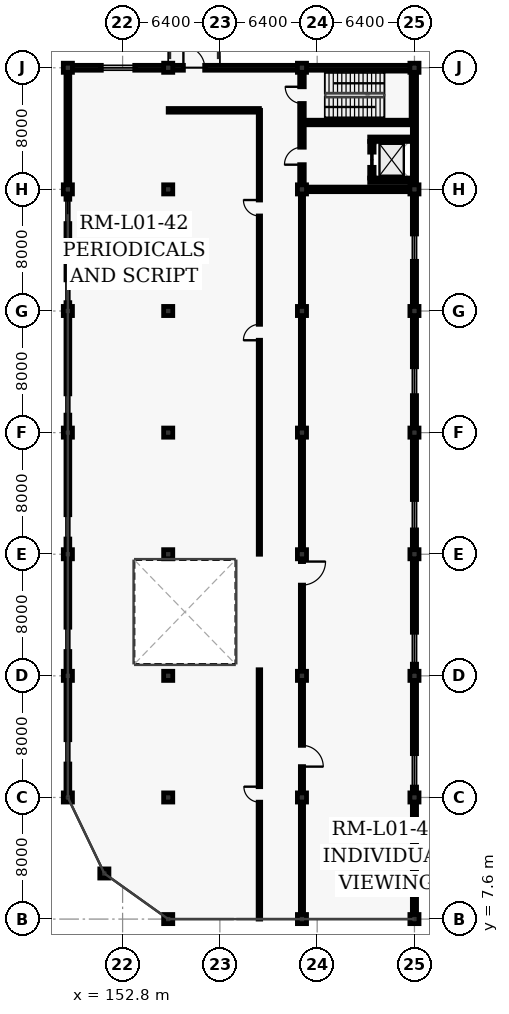
"""IFC4 building model, lengths in metres.
Left out: names, types, materials, properties, quantities, classifications, styles, units other than length and angle.
Written with IfcOpenShell. Run it as: python <this file> out.ifc"""

import sys

from ifc_helpers import new_model, si_unit, direction, frame, frame_2d, origin, origin_2d, place, context, subcontext, project, spatial, rectangle, extrude, element, fill, save


model = new_model("IFC4")
c1 = context("Model", 3, precision=1e-05, world=origin(), true_north=direction((0.0, 1.0)))
c2 = subcontext(c1, "Body", "Model", "MODEL_VIEW")
j1 = project(units=[si_unit("LENGTHUNIT", "METRE"), si_unit("PLANEANGLEUNIT", "RADIAN")], contexts=[c1])
p1 = place(None, origin())
s1 = spatial("IfcSite", under=j1, at=p1, CompositionType="ELEMENT")
p2 = place(p1, origin())
s2 = spatial("IfcBuilding", under=s1, at=p2, CompositionType="ELEMENT")
p3 = place(p2, frame((0.0, 0.0, 5.4)))
s3 = spatial("IfcBuildingStorey", under=s2, at=p3, CompositionType="ELEMENT", Elevation=5.4)
for number, where, z_axis, x_axis in (
    (1, (149.2, 15.6, 0.0), (0.0, 0.0, 1.0), (1.0, 0.0, 0.0)),
    (2, (149.2, 23.6, 0.0), (0.0, 0.0, 1.0), (1.0, 0.0, 0.0)),
    (3, (149.2, 31.6, 0.0), (0.0, 0.0, 1.0), (1.0, 0.0, 0.0)),
    (4, (149.2, 39.6, 0.0), (0.0, 0.0, 1.0), (1.0, 0.0, 0.0)),
    (5, (149.2, 47.6, 0.0), (0.0, 0.0, 1.0), (1.0, 0.0, 0.0)),
    (6, (149.2, 55.6, 0.0), (0.0, 0.0, 1.0), (1.0, 0.0, 0.0)),
    (7, (149.2, 63.6, 0.0), (0.0, 0.0, 1.0), (1.0, 0.0, 0.0)),
    (8, (151.6, 10.6, 0.0), (0.0, 0.0, 1.0), (1.0, 0.0, 0.0)),
    (9, (155.8, 7.6, 0.0), (0.0, 0.0, 1.0), (1.0, 0.0, 0.0)),
    (10, (155.8, 15.6, 0.0), (0.0, 0.0, 1.0), (1.0, 0.0, 0.0)),
    (11, (155.8, 23.6, 0.0), (0.0, 0.0, 1.0), (1.0, 0.0, 0.0)),
    (12, (155.8, 31.6, 0.0), (0.0, 0.0, 1.0), (1.0, 0.0, 0.0)),
    (13, (155.8, 39.6, 0.0), (0.0, 0.0, 1.0), (1.0, 0.0, 0.0)),
    (14, (155.8, 47.6, 0.0), (0.0, 0.0, 1.0), (1.0, 0.0, 0.0)),
    (15, (155.8, 55.6, 0.0), (0.0, 0.0, 1.0), (1.0, 0.0, 0.0)),
    (16, (155.8, 63.6, 0.0), (0.0, 0.0, 1.0), (1.0, 0.0, 0.0)),
    (17, (164.6, 7.6, 0.0), (0.0, 0.0, 1.0), (1.0, 0.0, 0.0)),
    (18, (164.6, 15.6, 0.0), (0.0, 0.0, 1.0), (1.0, 0.0, 0.0)),
    (19, (164.6, 23.6, 0.0), (0.0, 0.0, 1.0), (1.0, 0.0, 0.0)),
    (20, (164.6, 31.6, 0.0), (0.0, 0.0, 1.0), (1.0, 0.0, 0.0)),
    (21, (164.6, 39.6, 0.0), (0.0, 0.0, 1.0), (1.0, 0.0, 0.0)),
    (22, (164.6, 47.6, 0.0), (0.0, 0.0, 1.0), (1.0, 0.0, 0.0)),
    (23, (164.6, 55.6, 0.0), (0.0, 0.0, 1.0), (1.0, 0.0, 0.0)),
    (24, (164.6, 63.6, 0.0), (0.0, 0.0, 1.0), (1.0, 0.0, 0.0)),
    (25, (172.0, 7.6, 0.0), (0.0, 0.0, 1.0), (1.0, 0.0, 0.0)),
    (26, (172.0, 15.6, 0.0), (0.0, 0.0, 1.0), (1.0, 0.0, 0.0)),
    (27, (172.0, 23.6, 0.0), (0.0, 0.0, 1.0), (1.0, 0.0, 0.0)),
    (28, (172.0, 31.6, 0.0), (0.0, 0.0, 1.0), (1.0, 0.0, 0.0)),
    (29, (172.0, 39.6, 0.0), (0.0, 0.0, 1.0), (1.0, 0.0, 0.0)),
    (30, (172.0, 47.6, 0.0), (0.0, 0.0, 1.0), (1.0, 0.0, 0.0)),
    (31, (172.0, 55.6, 0.0), (0.0, 0.0, 1.0), (1.0, 0.0, 0.0)),
    (32, (172.0, 63.6, 0.0), (0.0, 0.0, 1.0), (1.0, 0.0, 0.0)),
):
    element("IfcColumn", number, at=place(p3, frame(where, z_axis=z_axis, x_axis=x_axis)), inside=s3, PredefinedType="COLUMN", context=c2, shape_type="SweptSolid", body=[
        extrude(rectangle(XDim=0.6, YDim=0.6, at=origin_2d()), origin(), (0.0, 0.0, 1.0), 4.8),
    ])
p4 = place(p3, frame((149.2, 15.6, 0.0), z_axis=(0.0, 0.0, 1.0), x_axis=(0.0, 1.0, 0.0)))
e33 = element("IfcWall", 33, at=p4, inside=s3, PredefinedType="SOLIDWALL", context=c2, shape_type="SweptSolid", body=[
    extrude(rectangle(XDim=48.0, YDim=0.25, at=frame_2d((24.0, 0.0))), origin(), (0.0, 0.0, 1.0), 3.67),
])
p5 = place(p4, frame((2.2, 0.0, 0.8)))
e34 = element("IfcOpeningElement", 34, at=p5, cuts=e33, PredefinedType="OPENING", context=c2, shape_type="SweptSolid", body=[
    extrude(rectangle(XDim=1.6, YDim=1.65, at=frame_2d((0.8, 0.825))), frame((0.0, 0.135, 0.0), z_axis=(0.0, -1.0, 0.0), x_axis=(1.0, 0.0, 0.0)), (0.0, 0.0, 1.0), 0.27),
])
p6 = place(p4, frame((9.6, 0.0, 0.8)))
e35 = element("IfcOpeningElement", 35, at=p6, cuts=e33, PredefinedType="OPENING", context=c2, shape_type="SweptSolid", body=[
    extrude(rectangle(XDim=1.6, YDim=1.65, at=frame_2d((0.8, 0.825))), frame((0.0, 0.135, 0.0), z_axis=(0.0, -1.0, 0.0), x_axis=(1.0, 0.0, 0.0)), (0.0, 0.0, 1.0), 0.27),
])
p7 = place(p4, frame((17.0, 0.0, 0.8)))
e36 = element("IfcOpeningElement", 36, at=p7, cuts=e33, PredefinedType="OPENING", context=c2, shape_type="SweptSolid", body=[
    extrude(rectangle(XDim=1.6, YDim=1.65, at=frame_2d((0.8, 0.825))), frame((0.0, 0.135, 0.0), z_axis=(0.0, -1.0, 0.0), x_axis=(1.0, 0.0, 0.0)), (0.0, 0.0, 1.0), 0.27),
])
p8 = place(p4, frame((25.15, 0.0, 0.8)))
e37 = element("IfcOpeningElement", 37, at=p8, cuts=e33, PredefinedType="OPENING", context=c2, shape_type="SweptSolid", body=[
    extrude(rectangle(XDim=1.4, YDim=2.1, at=frame_2d((0.7, 1.05))), frame((0.0, 0.135, 0.0), z_axis=(0.0, -1.0, 0.0), x_axis=(1.0, 0.0, 0.0)), (0.0, 0.0, 1.0), 0.27),
])
p9 = place(p4, frame((32.55, 0.0, 0.8)))
e38 = element("IfcOpeningElement", 38, at=p9, cuts=e33, PredefinedType="OPENING", context=c2, shape_type="SweptSolid", body=[
    extrude(rectangle(XDim=1.5, YDim=2.1, at=frame_2d((0.75, 1.05))), frame((0.0, 0.135, 0.0), z_axis=(0.0, -1.0, 0.0), x_axis=(1.0, 0.0, 0.0)), (0.0, 0.0, 1.0), 0.27),
])
p10 = place(p4, frame((37.75, 0.0, 0.8)))
e39 = element("IfcOpeningElement", 39, at=p10, cuts=e33, PredefinedType="OPENING", context=c2, shape_type="SweptSolid", body=[
    extrude(rectangle(XDim=1.6, YDim=2.1, at=frame_2d((0.8, 1.05))), frame((0.0, 0.135, 0.0), z_axis=(0.0, -1.0, 0.0), x_axis=(1.0, 0.0, 0.0)), (0.0, 0.0, 1.0), 0.27),
])
p11 = place(p3, frame((149.2, 63.6, 0.0), z_axis=(0.0, 0.0, 1.0), x_axis=(1.0, 0.0, 0.0)))
e40 = element("IfcWall", 40, at=p11, inside=s3, PredefinedType="SOLIDWALL", context=c2, shape_type="SweptSolid", body=[
    extrude(rectangle(XDim=22.8, YDim=0.32, at=frame_2d((11.4, 0.0))), origin(), (0.0, 0.0, 1.0), 3.67),
])
p12 = place(p11, frame((2.2, 0.0, 0.9)))
e41 = element("IfcOpeningElement", 41, at=p12, cuts=e40, PredefinedType="OPENING", context=c2, shape_type="SweptSolid", body=[
    extrude(rectangle(XDim=2.2, YDim=1.7, at=frame_2d((1.1, 0.85))), frame((0.0, 0.17, 0.0), z_axis=(0.0, -1.0, 0.0), x_axis=(1.0, 0.0, 0.0)), (0.0, 0.0, 1.0), 0.34),
])
p13 = place(p11, frame((7.6, 0.0, 0.0)))
e42 = element("IfcOpeningElement", 42, at=p13, cuts=e40, PredefinedType="OPENING", context=c2, shape_type="SweptSolid", body=[
    extrude(rectangle(XDim=1.4, YDim=2.25, at=frame_2d((0.7, 1.125))), frame((0.0, 0.17, 0.0), z_axis=(0.0, -1.0, 0.0), x_axis=(1.0, 0.0, 0.0)), (0.0, 0.0, 1.0), 0.34),
])
p14 = place(p3, frame((172.0, 63.6, 0.0), z_axis=(0.0, 0.0, 1.0), x_axis=(0.0, -1.0, 0.0)))
e43 = element("IfcWall", 43, at=p14, inside=s3, PredefinedType="SOLIDWALL", context=c2, shape_type="SweptSolid", body=[
    extrude(rectangle(XDim=56.0, YDim=0.275, at=frame_2d((28.0, 0.0))), origin(), (0.0, 0.0, 1.0), 3.67),
])
p15 = place(p14, frame((10.933, 0.0, 0.8)))
e44 = element("IfcOpeningElement", 44, at=p15, cuts=e43, PredefinedType="OPENING", context=c2, shape_type="SweptSolid", body=[
    extrude(rectangle(XDim=1.8, YDim=2.15, at=frame_2d((0.9, 1.075))), frame((0.0, 0.147, 0.0), z_axis=(0.0, -1.0, 0.0), x_axis=(1.0, 0.0, 0.0)), (0.0, 0.0, 1.0), 0.295),
])
p16 = place(p14, frame((19.667, 0.0, 0.8)))
e45 = element("IfcOpeningElement", 45, at=p16, cuts=e43, PredefinedType="OPENING", context=c2, shape_type="SweptSolid", body=[
    extrude(rectangle(XDim=1.9, YDim=2.2, at=frame_2d((0.95, 1.1))), frame((0.0, 0.147, 0.0), z_axis=(0.0, -1.0, 0.0), x_axis=(1.0, 0.0, 0.0)), (0.0, 0.0, 1.0), 0.295),
])
p17 = place(p14, frame((28.4, 0.0, 0.8)))
e46 = element("IfcOpeningElement", 46, at=p17, cuts=e43, PredefinedType="OPENING", context=c2, shape_type="SweptSolid", body=[
    extrude(rectangle(XDim=2.0, YDim=2.2, at=frame_2d((1.0, 1.1))), frame((0.0, 0.147, 0.0), z_axis=(0.0, -1.0, 0.0), x_axis=(1.0, 0.0, 0.0)), (0.0, 0.0, 1.0), 0.295),
])
p18 = place(p14, frame((37.133, 0.0, 0.8)))
e47 = element("IfcOpeningElement", 47, at=p18, cuts=e43, PredefinedType="OPENING", context=c2, shape_type="SweptSolid", body=[
    extrude(rectangle(XDim=2.1, YDim=2.2, at=frame_2d((1.05, 1.1))), frame((0.0, 0.147, 0.0), z_axis=(0.0, -1.0, 0.0), x_axis=(1.0, 0.0, 0.0)), (0.0, 0.0, 1.0), 0.295),
])
p19 = place(p14, frame((45.117, 0.0, 0.8)))
e48 = element("IfcOpeningElement", 48, at=p19, cuts=e43, PredefinedType="OPENING", context=c2, shape_type="SweptSolid", body=[
    extrude(rectangle(XDim=2.2, YDim=2.25, at=frame_2d((1.1, 1.125))), frame((0.0, 0.147, 0.0), z_axis=(0.0, -1.0, 0.0), x_axis=(1.0, 0.0, 0.0)), (0.0, 0.0, 1.0), 0.295),
])
p20 = place(p3, frame((164.902, 55.6, 0.0), z_axis=(0.0, 0.0, 1.0), x_axis=(1.0, 0.0, 0.0)))
e49 = element("IfcWall", 49, at=p20, inside=s3, PredefinedType="SHEAR", context=c2, shape_type="SweptSolid", body=[
    extrude(rectangle(XDim=6.796, YDim=0.3, at=frame_2d((3.398, 0.0))), origin(), (0.0, 0.0, 1.0), 4.52),
])
p21 = place(p3, frame((164.6, 55.902, 0.0), z_axis=(0.0, 0.0, 1.0), x_axis=(0.0, 1.0, 0.0)))
e50 = element("IfcWall", 50, at=p21, inside=s3, PredefinedType="SHEAR", context=c2, shape_type="SweptSolid", body=[
    extrude(rectangle(XDim=7.396, YDim=0.3, at=frame_2d((3.698, 0.0))), origin(), (0.0, 0.0, 1.0), 4.52),
])
p22 = place(p21, frame((5.348, 0.0, 0.0)))
e51 = element("IfcOpeningElement", 51, at=p22, cuts=e50, PredefinedType="OPENING", context=c2, shape_type="SweptSolid", body=[
    extrude(rectangle(XDim=1.1, YDim=2.15, at=frame_2d((0.55, 1.075))), frame((0.0, 0.16, 0.0), z_axis=(0.0, -1.0, 0.0), x_axis=(1.0, 0.0, 0.0)), (0.0, 0.0, 1.0), 0.32),
])
p23 = place(p21, frame((1.323, 0.0, 0.0)))
e52 = element("IfcOpeningElement", 52, at=p23, cuts=e50, PredefinedType="OPENING", context=c2, shape_type="SweptSolid", body=[
    extrude(rectangle(XDim=1.15, YDim=2.2, at=frame_2d((0.575, 1.1))), frame((0.0, 0.16, 0.0), z_axis=(0.0, -1.0, 0.0), x_axis=(1.0, 0.0, 0.0)), (0.0, 0.0, 1.0), 0.32),
])
p24 = place(p3, frame((164.75, 60.0, 0.0), z_axis=(0.0, 0.0, 1.0), x_axis=(1.0, 0.0, 0.0)))
e53 = element("IfcWall", 53, at=p24, inside=s3, PredefinedType="SHEAR", context=c2, shape_type="SweptSolid", body=[
    extrude(rectangle(XDim=7.1, YDim=0.3, at=frame_2d((3.55, 0.0))), origin(), (0.0, 0.0, 1.0), 4.52),
])
for number, where, z_axis, x_axis in (
    (54, (169.055, 56.2, 0.0), (0.0, 0.0, 1.0), (1.0, 0.0, 0.0)),
    (55, (169.055, 58.9, 0.0), (0.0, 0.0, 1.0), (1.0, 0.0, 0.0)),
):
    element("IfcWall", number, at=place(p3, frame(where, z_axis=z_axis, x_axis=x_axis)), inside=s3, PredefinedType="SHEAR", context=c2, shape_type="SweptSolid", body=[
        extrude(rectangle(XDim=2.89, YDim=0.29, at=frame_2d((1.445, 0.0))), origin(), (0.0, 0.0, 1.0), 4.52),
    ])
p25 = place(p3, frame((169.2, 56.345, 0.0), z_axis=(0.0, 0.0, 1.0), x_axis=(0.0, 1.0, 0.0)))
e56 = element("IfcWall", 56, at=p25, inside=s3, PredefinedType="SHEAR", context=c2, shape_type="SweptSolid", body=[
    extrude(rectangle(XDim=2.41, YDim=0.29, at=frame_2d((1.205, 0.0))), origin(), (0.0, 0.0, 1.0), 4.52),
])
p26 = place(p25, frame((0.705, 0.0, 0.0)))
e57 = element("IfcOpeningElement", 57, at=p26, cuts=e56, PredefinedType="OPENING", context=c2, shape_type="SweptSolid", body=[
    extrude(rectangle(XDim=1.0, YDim=2.15, at=frame_2d((0.5, 1.075))), frame((0.0, 0.155, 0.0), z_axis=(0.0, -1.0, 0.0), x_axis=(1.0, 0.0, 0.0)), (0.0, 0.0, 1.0), 0.31),
])
p27 = place(p3, frame((161.8, 7.6, 0.0), z_axis=(0.0, 0.0, 1.0), x_axis=(0.0, 1.0, 0.0)))
e58 = element("IfcWall", 58, at=p27, inside=s3, PredefinedType="PARTITIONING", context=c2, shape_type="SweptSolid", body=[
    extrude(rectangle(XDim=16.4, YDim=0.165, at=frame_2d((8.2, 0.0))), origin(), (0.0, 0.0, 1.0), 4.52),
])
p28 = place(p27, frame((7.69, 0.0, 0.0)))
e59 = element("IfcOpeningElement", 59, at=p28, cuts=e58, PredefinedType="OPENING", context=c2, shape_type="SweptSolid", body=[
    extrude(rectangle(XDim=1.02, YDim=2.1, at=frame_2d((0.51, 1.05))), frame((0.0, 0.093, 0.0), z_axis=(0.0, -1.0, 0.0), x_axis=(1.0, 0.0, 0.0)), (0.0, 0.0, 1.0), 0.185),
])
p29 = place(p3, frame((161.8, 31.6, 0.0), z_axis=(0.0, 0.0, 1.0), x_axis=(0.0, 1.0, 0.0)))
e60 = element("IfcWall", 60, at=p29, inside=s3, PredefinedType="PARTITIONING", context=c2, shape_type="SweptSolid", body=[
    extrude(rectangle(XDim=29.2, YDim=0.15, at=frame_2d((14.6, 0.0))), origin(), (0.0, 0.0, 1.0), 4.52),
])
p30 = place(p29, frame((14.075, 0.0, 0.0)))
e61 = element("IfcOpeningElement", 61, at=p30, cuts=e60, PredefinedType="OPENING", context=c2, shape_type="SweptSolid", body=[
    extrude(rectangle(XDim=1.05, YDim=2.15, at=frame_2d((0.525, 1.075))), frame((0.0, 0.085, 0.0), z_axis=(0.0, -1.0, 0.0), x_axis=(1.0, 0.0, 0.0)), (0.0, 0.0, 1.0), 0.17),
])
p31 = place(p29, frame((22.251, 0.0, 0.0)))
e62 = element("IfcOpeningElement", 62, at=p31, cuts=e60, PredefinedType="OPENING", context=c2, shape_type="SweptSolid", body=[
    extrude(rectangle(XDim=1.05, YDim=2.15, at=frame_2d((0.525, 1.075))), frame((0.0, 0.085, 0.0), z_axis=(0.0, -1.0, 0.0), x_axis=(1.0, 0.0, 0.0)), (0.0, 0.0, 1.0), 0.17),
])
p32 = place(p3, frame((161.8, 60.8, 0.0), z_axis=(0.0, 0.0, 1.0), x_axis=(-1.0, 0.0, 0.0)))
e63 = element("IfcWall", 63, at=p32, inside=s3, PredefinedType="PARTITIONING", context=c2, shape_type="SweptSolid", body=[
    extrude(rectangle(XDim=6.0, YDim=0.24, at=frame_2d((3.0, 0.0))), origin(), (0.0, 0.0, 1.0), 4.52),
])
p33 = place(p3, frame((164.6, 55.298, 0.0), z_axis=(0.0, 0.0, 1.0), x_axis=(0.0, -1.0, 0.0)))
e64 = element("IfcWall", 64, at=p33, inside=s3, PredefinedType="PARTITIONING", context=c2, shape_type="SweptSolid", body=[
    extrude(rectangle(XDim=47.396, YDim=0.21, at=frame_2d((23.698, 0.0))), origin(), (0.0, 0.0, 1.0), 3.67),
])
p34 = place(p33, frame((24.18, 0.0, 0.0)))
e65 = element("IfcOpeningElement", 65, at=p34, cuts=e64, PredefinedType="OPENING", context=c2, shape_type="SweptSolid", body=[
    extrude(rectangle(XDim=1.55, YDim=2.25, at=frame_2d((0.775, 1.125))), frame((0.0, 0.115, 0.0), z_axis=(0.0, -1.0, 0.0), x_axis=(1.0, 0.0, 0.0)), (0.0, 0.0, 1.0), 0.23),
])
p35 = place(p33, frame((36.269, 0.0, 0.0)))
e66 = element("IfcOpeningElement", 66, at=p35, cuts=e64, PredefinedType="OPENING", context=c2, shape_type="SweptSolid", body=[
    extrude(rectangle(XDim=1.4, YDim=2.25, at=frame_2d((0.7, 1.125))), frame((0.0, 0.115, 0.0), z_axis=(0.0, -1.0, 0.0), x_axis=(1.0, 0.0, 0.0)), (0.0, 0.0, 1.0), 0.23),
])
p36 = place(p5, origin())
e67 = element("IfcWindow", 67, at=p36, inside=s3, PartitioningType="SINGLE_PANEL", PredefinedType="WINDOW", context=c2, shape_type="SweptSolid", body=[
    extrude(rectangle(XDim=1.6, YDim=1.65, at=frame_2d((0.8, 0.825))), frame((0.0, 0.03, 0.0), z_axis=(0.0, -1.0, 0.0), x_axis=(1.0, 0.0, 0.0)), (0.0, 0.0, 1.0), 0.06),
])
fill(e34, e67)
p37 = place(p6, origin())
e68 = element("IfcWindow", 68, at=p37, inside=s3, PartitioningType="SINGLE_PANEL", PredefinedType="WINDOW", context=c2, shape_type="SweptSolid", body=[
    extrude(rectangle(XDim=1.6, YDim=1.65, at=frame_2d((0.8, 0.825))), frame((0.0, 0.03, 0.0), z_axis=(0.0, -1.0, 0.0), x_axis=(1.0, 0.0, 0.0)), (0.0, 0.0, 1.0), 0.06),
])
fill(e35, e68)
p38 = place(p7, origin())
e69 = element("IfcWindow", 69, at=p38, inside=s3, PartitioningType="SINGLE_PANEL", PredefinedType="WINDOW", context=c2, shape_type="SweptSolid", body=[
    extrude(rectangle(XDim=1.6, YDim=1.65, at=frame_2d((0.8, 0.825))), frame((0.0, 0.03, 0.0), z_axis=(0.0, -1.0, 0.0), x_axis=(1.0, 0.0, 0.0)), (0.0, 0.0, 1.0), 0.06),
])
fill(e36, e69)
p39 = place(p8, origin())
e70 = element("IfcWindow", 70, at=p39, inside=s3, PartitioningType="SINGLE_PANEL", PredefinedType="WINDOW", context=c2, shape_type="SweptSolid", body=[
    extrude(rectangle(XDim=1.4, YDim=2.1, at=frame_2d((0.7, 1.05))), frame((0.0, 0.03, 0.0), z_axis=(0.0, -1.0, 0.0), x_axis=(1.0, 0.0, 0.0)), (0.0, 0.0, 1.0), 0.06),
])
fill(e37, e70)
p40 = place(p9, origin())
e71 = element("IfcWindow", 71, at=p40, inside=s3, PartitioningType="SINGLE_PANEL", PredefinedType="WINDOW", context=c2, shape_type="SweptSolid", body=[
    extrude(rectangle(XDim=1.5, YDim=2.1, at=frame_2d((0.75, 1.05))), frame((0.0, 0.03, 0.0), z_axis=(0.0, -1.0, 0.0), x_axis=(1.0, 0.0, 0.0)), (0.0, 0.0, 1.0), 0.06),
])
fill(e38, e71)
p41 = place(p10, origin())
e72 = element("IfcWindow", 72, at=p41, inside=s3, PartitioningType="SINGLE_PANEL", PredefinedType="WINDOW", context=c2, shape_type="SweptSolid", body=[
    extrude(rectangle(XDim=1.6, YDim=2.1, at=frame_2d((0.8, 1.05))), frame((0.0, 0.03, 0.0), z_axis=(0.0, -1.0, 0.0), x_axis=(1.0, 0.0, 0.0)), (0.0, 0.0, 1.0), 0.06),
])
fill(e39, e72)
p42 = place(p12, origin())
e73 = element("IfcWindow", 73, at=p42, inside=s3, PartitioningType="SINGLE_PANEL", PredefinedType="WINDOW", context=c2, shape_type="SweptSolid", body=[
    extrude(rectangle(XDim=2.2, YDim=1.7, at=frame_2d((1.1, 0.85))), frame((0.0, 0.03, 0.0), z_axis=(0.0, -1.0, 0.0), x_axis=(1.0, 0.0, 0.0)), (0.0, 0.0, 1.0), 0.06),
])
fill(e41, e73)
p43 = place(p15, origin())
e74 = element("IfcWindow", 74, at=p43, inside=s3, PartitioningType="SINGLE_PANEL", PredefinedType="WINDOW", context=c2, shape_type="SweptSolid", body=[
    extrude(rectangle(XDim=1.8, YDim=2.15, at=frame_2d((0.9, 1.075))), frame((0.0, 0.03, 0.0), z_axis=(0.0, -1.0, 0.0), x_axis=(1.0, 0.0, 0.0)), (0.0, 0.0, 1.0), 0.06),
])
fill(e44, e74)
p44 = place(p16, origin())
e75 = element("IfcWindow", 75, at=p44, inside=s3, PartitioningType="SINGLE_PANEL", PredefinedType="WINDOW", context=c2, shape_type="SweptSolid", body=[
    extrude(rectangle(XDim=1.9, YDim=2.2, at=frame_2d((0.95, 1.1))), frame((0.0, 0.03, 0.0), z_axis=(0.0, -1.0, 0.0), x_axis=(1.0, 0.0, 0.0)), (0.0, 0.0, 1.0), 0.06),
])
fill(e45, e75)
p45 = place(p17, origin())
e76 = element("IfcWindow", 76, at=p45, inside=s3, PartitioningType="SINGLE_PANEL", PredefinedType="WINDOW", context=c2, shape_type="SweptSolid", body=[
    extrude(rectangle(XDim=2.0, YDim=2.2, at=frame_2d((1.0, 1.1))), frame((0.0, 0.03, 0.0), z_axis=(0.0, -1.0, 0.0), x_axis=(1.0, 0.0, 0.0)), (0.0, 0.0, 1.0), 0.06),
])
fill(e46, e76)
p46 = place(p18, origin())
e77 = element("IfcWindow", 77, at=p46, inside=s3, PartitioningType="SINGLE_PANEL", PredefinedType="WINDOW", context=c2, shape_type="SweptSolid", body=[
    extrude(rectangle(XDim=2.1, YDim=2.2, at=frame_2d((1.05, 1.1))), frame((0.0, 0.03, 0.0), z_axis=(0.0, -1.0, 0.0), x_axis=(1.0, 0.0, 0.0)), (0.0, 0.0, 1.0), 0.06),
])
fill(e47, e77)
p47 = place(p19, origin())
e78 = element("IfcWindow", 78, at=p47, inside=s3, PartitioningType="SINGLE_PANEL", PredefinedType="WINDOW", context=c2, shape_type="SweptSolid", body=[
    extrude(rectangle(XDim=2.2, YDim=2.25, at=frame_2d((1.1, 1.125))), frame((0.0, 0.03, 0.0), z_axis=(0.0, -1.0, 0.0), x_axis=(1.0, 0.0, 0.0)), (0.0, 0.0, 1.0), 0.06),
])
fill(e48, e78)
p48 = place(p22, origin())
e79 = element("IfcDoor", 79, at=p48, inside=s3, OperationType="SINGLE_SWING_RIGHT", PredefinedType="DOOR", context=c2, shape_type="SweptSolid", body=[
    extrude(rectangle(XDim=1.1, YDim=2.15, at=frame_2d((0.55, 1.075))), frame((0.0, 0.025, 0.0), z_axis=(0.0, -1.0, 0.0), x_axis=(1.0, 0.0, 0.0)), (0.0, 0.0, 1.0), 0.05),
])
fill(e51, e79)
p49 = place(p23, origin())
e80 = element("IfcDoor", 80, at=p49, inside=s3, OperationType="SINGLE_SWING_LEFT", PredefinedType="DOOR", context=c2, shape_type="SweptSolid", body=[
    extrude(rectangle(XDim=1.15, YDim=2.2, at=frame_2d((0.575, 1.1))), frame((0.0, 0.025, 0.0), z_axis=(0.0, -1.0, 0.0), x_axis=(1.0, 0.0, 0.0)), (0.0, 0.0, 1.0), 0.05),
])
fill(e52, e80)
p50 = place(p26, origin())
e81 = element("IfcDoor", 81, at=p50, inside=s3, OperationType="SLIDING_TO_LEFT", PredefinedType="DOOR", context=c2, shape_type="SweptSolid", body=[
    extrude(rectangle(XDim=1.0, YDim=2.15, at=frame_2d((0.5, 1.075))), frame((0.0, 0.025, 0.0), z_axis=(0.0, -1.0, 0.0), x_axis=(1.0, 0.0, 0.0)), (0.0, 0.0, 1.0), 0.05),
])
fill(e57, e81)
p51 = place(p13, origin())
e82 = element("IfcDoor", 82, at=p51, inside=s3, OperationType="SINGLE_SWING_LEFT", PredefinedType="DOOR", context=c2, shape_type="SweptSolid", body=[
    extrude(rectangle(XDim=1.4, YDim=2.25, at=frame_2d((0.7, 1.125))), frame((0.0, 0.025, 0.0), z_axis=(0.0, -1.0, 0.0), x_axis=(1.0, 0.0, 0.0)), (0.0, 0.0, 1.0), 0.05),
])
fill(e42, e82)
p52 = place(p28, origin())
e83 = element("IfcDoor", 83, at=p52, inside=s3, OperationType="SINGLE_SWING_RIGHT", PredefinedType="DOOR", context=c2, shape_type="SweptSolid", body=[
    extrude(rectangle(XDim=1.02, YDim=2.1, at=frame_2d((0.51, 1.05))), frame((0.0, 0.025, 0.0), z_axis=(0.0, -1.0, 0.0), x_axis=(1.0, 0.0, 0.0)), (0.0, 0.0, 1.0), 0.05),
])
fill(e59, e83)
p53 = place(p30, origin())
e84 = element("IfcDoor", 84, at=p53, inside=s3, OperationType="SINGLE_SWING_LEFT", PredefinedType="DOOR", context=c2, shape_type="SweptSolid", body=[
    extrude(rectangle(XDim=1.05, YDim=2.15, at=frame_2d((0.525, 1.075))), frame((0.0, 0.025, 0.0), z_axis=(0.0, -1.0, 0.0), x_axis=(1.0, 0.0, 0.0)), (0.0, 0.0, 1.0), 0.05),
])
fill(e61, e84)
p54 = place(p31, origin())
e85 = element("IfcDoor", 85, at=p54, inside=s3, OperationType="SINGLE_SWING_RIGHT", PredefinedType="DOOR", context=c2, shape_type="SweptSolid", body=[
    extrude(rectangle(XDim=1.05, YDim=2.15, at=frame_2d((0.525, 1.075))), frame((0.0, 0.025, 0.0), z_axis=(0.0, -1.0, 0.0), x_axis=(1.0, 0.0, 0.0)), (0.0, 0.0, 1.0), 0.05),
])
fill(e62, e85)
p55 = place(p34, origin())
e86 = element("IfcDoor", 86, at=p55, inside=s3, OperationType="SINGLE_SWING_LEFT", PredefinedType="DOOR", context=c2, shape_type="SweptSolid", body=[
    extrude(rectangle(XDim=1.55, YDim=2.25, at=frame_2d((0.775, 1.125))), frame((0.0, 0.025, 0.0), z_axis=(0.0, -1.0, 0.0), x_axis=(1.0, 0.0, 0.0)), (0.0, 0.0, 1.0), 0.05),
])
fill(e65, e86)
p56 = place(p35, origin())
e87 = element("IfcDoor", 87, at=p56, inside=s3, OperationType="SINGLE_SWING_RIGHT", PredefinedType="DOOR", context=c2, shape_type="SweptSolid", body=[
    extrude(rectangle(XDim=1.4, YDim=2.25, at=frame_2d((0.7, 1.125))), frame((0.0, 0.025, 0.0), z_axis=(0.0, -1.0, 0.0), x_axis=(1.0, 0.0, 0.0)), (0.0, 0.0, 1.0), 0.05),
])
fill(e66, e87)
save(model, sys.argv[1])
